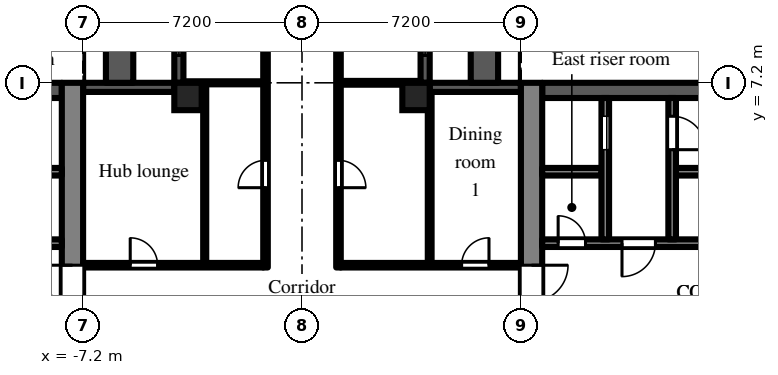
"""IFC4 building model, lengths in metres.
Left out: names, types, materials, properties, quantities, classifications, styles, units other than length and angle.
Written with IfcOpenShell. Run it as: python <this file> out.ifc"""

import sys

from ifc_helpers import new_model, si_unit, direction, frame, frame_2d, origin, origin_2d, place, context, subcontext, project, spatial, rectangle, extrude, element, fill, save


model = new_model("IFC4")
c1 = context("Model", 3, precision=1e-05, world=origin(), true_north=direction((0.0, 1.0)))
c2 = subcontext(c1, "Body", "Model", "MODEL_VIEW")
j1 = project(units=[si_unit("LENGTHUNIT", "METRE"), si_unit("PLANEANGLEUNIT", "RADIAN")], contexts=[c1])
p1 = place(None, origin())
s1 = spatial("IfcSite", under=j1, at=p1, CompositionType="ELEMENT")
p2 = place(p1, origin())
s2 = spatial("IfcBuilding", under=s1, at=p2, CompositionType="ELEMENT")
p3 = place(p2, frame((0.0, 0.0, 11.7)))
s3 = spatial("IfcBuildingStorey", under=s2, at=p3, CompositionType="ELEMENT", Elevation=11.7)
for number, where, z_axis, x_axis in (
    (1, (-3.75, 6.75, 0.0), (0.0, 0.0, 1.0), (1.0, 0.0, 0.0)),
    (2, (3.75, 6.75, 0.0), (0.0, 0.0, 1.0), (1.0, 0.0, 0.0)),
):
    element("IfcColumn", number, at=place(p3, frame(where, z_axis=z_axis, x_axis=x_axis)), inside=s3, PredefinedType="COLUMN", context=c2, shape_type="SweptSolid", body=[
        extrude(rectangle(XDim=0.9, YDim=0.9, at=origin_2d()), origin(), (0.0, 0.0, 1.0), 3.0),
    ])
p4 = place(p3, frame((7.2, 7.05, 0.0), z_axis=(0.0, 0.0, 1.0), x_axis=(-1.0, 0.0, 0.0)))
e3 = element("IfcWall", 3, at=p4, inside=s3, PredefinedType="SOLIDWALL", context=c2, shape_type="SweptSolid", body=[
    extrude(rectangle(XDim=3.0, YDim=0.3, at=frame_2d((1.5, 0.0))), origin(), (0.0, 0.0, 1.0), 2.1),
])
p5 = place(p3, frame((4.05, 7.2, 0.0), z_axis=(0.0, 0.0, 1.0), x_axis=(0.0, 1.0, 0.0)))
e4 = element("IfcWall", 4, at=p5, inside=s3, PredefinedType="SOLIDWALL", context=c2, shape_type="SweptSolid", body=[
    extrude(rectangle(XDim=7.2, YDim=0.3, at=frame_2d((3.6, 0.0))), origin(), (0.0, 0.0, 1.0), 2.1),
])
p6 = place(p5, frame((3.0, 0.0, 0.0)))
e5 = element("IfcOpeningElement", 5, at=p6, cuts=e4, PredefinedType="OPENING", context=c2, shape_type="SweptSolid", body=[
    extrude(rectangle(XDim=1.2, YDim=2.05, at=frame_2d((0.6, 1.025))), frame((0.0, 0.16, 0.0), z_axis=(0.0, -1.0, 0.0), x_axis=(1.0, 0.0, 0.0)), (0.0, 0.0, 1.0), 0.32),
])
p7 = place(p5, frame((0.9, 0.0, 0.2)))
e6 = element("IfcOpeningElement", 6, at=p7, cuts=e4, PredefinedType="OPENING", context=c2, shape_type="SweptSolid", body=[
    extrude(rectangle(XDim=1.8, YDim=1.85, at=frame_2d((0.9, 0.925))), frame((0.0, 0.16, 0.0), z_axis=(0.0, -1.0, 0.0), x_axis=(1.0, 0.0, 0.0)), (0.0, 0.0, 1.0), 0.32),
])
p8 = place(p5, frame((4.5, 0.0, 0.2)))
e7 = element("IfcOpeningElement", 7, at=p8, cuts=e4, PredefinedType="OPENING", context=c2, shape_type="SweptSolid", body=[
    extrude(rectangle(XDim=1.8, YDim=1.85, at=frame_2d((0.9, 0.925))), frame((0.0, 0.16, 0.0), z_axis=(0.0, -1.0, 0.0), x_axis=(1.0, 0.0, 0.0)), (0.0, 0.0, 1.0), 0.32),
])
p9 = place(p3, frame((-4.05, 14.4, 0.0), z_axis=(0.0, 0.0, 1.0), x_axis=(0.0, -1.0, 0.0)))
e8 = element("IfcWall", 8, at=p9, inside=s3, PredefinedType="SOLIDWALL", context=c2, shape_type="SweptSolid", body=[
    extrude(rectangle(XDim=7.2, YDim=0.3, at=frame_2d((3.6, 0.0))), origin(), (0.0, 0.0, 1.0), 2.1),
])
p10 = place(p9, frame((3.0, 0.0, 0.0)))
e9 = element("IfcOpeningElement", 9, at=p10, cuts=e8, PredefinedType="OPENING", context=c2, shape_type="SweptSolid", body=[
    extrude(rectangle(XDim=1.2, YDim=2.05, at=frame_2d((0.6, 1.025))), frame((0.0, 0.16, 0.0), z_axis=(0.0, -1.0, 0.0), x_axis=(1.0, 0.0, 0.0)), (0.0, 0.0, 1.0), 0.32),
])
p11 = place(p9, frame((0.9, 0.0, 0.2)))
e10 = element("IfcOpeningElement", 10, at=p11, cuts=e8, PredefinedType="OPENING", context=c2, shape_type="SweptSolid", body=[
    extrude(rectangle(XDim=1.8, YDim=1.85, at=frame_2d((0.9, 0.925))), frame((0.0, 0.16, 0.0), z_axis=(0.0, -1.0, 0.0), x_axis=(1.0, 0.0, 0.0)), (0.0, 0.0, 1.0), 0.32),
])
p12 = place(p9, frame((4.5, 0.0, 0.2)))
e11 = element("IfcOpeningElement", 11, at=p12, cuts=e8, PredefinedType="OPENING", context=c2, shape_type="SweptSolid", body=[
    extrude(rectangle(XDim=1.8, YDim=1.85, at=frame_2d((0.9, 0.925))), frame((0.0, 0.16, 0.0), z_axis=(0.0, -1.0, 0.0), x_axis=(1.0, 0.0, 0.0)), (0.0, 0.0, 1.0), 0.32),
])
p13 = place(p3, frame((-4.2, 7.05, 0.0), z_axis=(0.0, 0.0, 1.0), x_axis=(-1.0, 0.0, 0.0)))
e12 = element("IfcWall", 12, at=p13, inside=s3, PredefinedType="SOLIDWALL", context=c2, shape_type="SweptSolid", body=[
    extrude(rectangle(XDim=3.0, YDim=0.3, at=frame_2d((1.5, 0.0))), origin(), (0.0, 0.0, 1.0), 2.1),
])
for number, where, z_axis, x_axis in (
    (13, (6.0, 7.2, 0.0), (0.0, 0.0, 1.0), (0.0, 1.0, 0.0)),
    (14, (-6.0, 7.2, 0.0), (0.0, 0.0, 1.0), (0.0, 1.0, 0.0)),
):
    element("IfcWall", number, at=place(p3, frame(where, z_axis=z_axis, x_axis=x_axis)), inside=s3, PredefinedType="PARAPET", context=c2, shape_type="SweptSolid", body=[
        extrude(rectangle(XDim=7.2, YDim=0.9, at=frame_2d((3.6, 0.0))), origin(), (0.0, 0.0, 1.0), 0.8),
    ])
p14 = place(p3, frame((7.55, -7.2, 0.0), z_axis=(0.0, 0.0, 1.0), x_axis=(0.0, 1.0, 0.0)))
e15 = element("IfcWall", 15, at=p14, inside=s3, PredefinedType="SHEAR", context=c2, shape_type="SweptSolid", body=[
    extrude(rectangle(XDim=14.4, YDim=0.7, at=frame_2d((7.2, 0.0))), origin(), (0.0, 0.0, 1.0), 2.575),
])
p15 = place(p14, frame((6.0, 0.0, 0.0)))
e16 = element("IfcOpeningElement", 16, at=p15, cuts=e15, PredefinedType="OPENING", context=c2, shape_type="SweptSolid", body=[
    extrude(rectangle(XDim=2.4, YDim=2.2, at=frame_2d((1.2, 1.1))), frame((0.0, 0.36, 0.0), z_axis=(0.0, -1.0, 0.0), x_axis=(1.0, 0.0, 0.0)), (0.0, 0.0, 1.0), 0.72),
])
p16 = place(p3, frame((7.9, 6.95, 0.0), z_axis=(0.0, 0.0, 1.0), x_axis=(1.0, 0.0, 0.0)))
e17 = element("IfcWall", 17, at=p16, inside=s3, PredefinedType="SHEAR", context=c2, shape_type="SweptSolid", body=[
    extrude(rectangle(XDim=12.95, YDim=0.5, at=frame_2d((6.475, 0.0))), origin(), (0.0, 0.0, 1.0), 2.575),
])
p17 = place(p3, frame((7.9, 1.925, 0.0), z_axis=(0.0, 0.0, 1.0), x_axis=(1.0, 0.0, 0.0)))
e18 = element("IfcWall", 18, at=p17, inside=s3, PredefinedType="SHEAR", context=c2, shape_type="SweptSolid", body=[
    extrude(rectangle(XDim=12.95, YDim=0.25, at=frame_2d((6.475, 0.0))), origin(), (0.0, 0.0, 1.0), 2.575),
])
p18 = place(p17, frame((0.525, 0.0, 0.0)))
e19 = element("IfcOpeningElement", 19, at=p18, cuts=e18, PredefinedType="OPENING", context=c2, shape_type="SweptSolid", body=[
    extrude(rectangle(XDim=0.9, YDim=2.1, at=frame_2d((0.45, 1.05))), frame((0.0, 0.135, 0.0), z_axis=(0.0, -1.0, 0.0), x_axis=(1.0, 0.0, 0.0)), (0.0, 0.0, 1.0), 0.27),
])
p19 = place(p17, frame((2.625, 0.0, 0.0)))
e20 = element("IfcOpeningElement", 20, at=p19, cuts=e18, PredefinedType="OPENING", context=c2, shape_type="SweptSolid", body=[
    extrude(rectangle(XDim=1.1, YDim=2.1, at=frame_2d((0.55, 1.05))), frame((0.0, 0.135, 0.0), z_axis=(0.0, -1.0, 0.0), x_axis=(1.0, 0.0, 0.0)), (0.0, 0.0, 1.0), 0.27),
])
p20 = place(p17, frame((7.125, 0.0, 0.0)))
e21 = element("IfcOpeningElement", 21, at=p20, cuts=e18, PredefinedType="OPENING", context=c2, shape_type="SweptSolid", body=[
    extrude(rectangle(XDim=0.9, YDim=2.1, at=frame_2d((0.45, 1.05))), frame((0.0, 0.135, 0.0), z_axis=(0.0, -1.0, 0.0), x_axis=(1.0, 0.0, 0.0)), (0.0, 0.0, 1.0), 0.27),
])
p21 = place(p3, frame((7.9, 4.275, 0.0), z_axis=(0.0, 0.0, 1.0), x_axis=(1.0, 0.0, 0.0)))
e22 = element("IfcWall", 22, at=p21, inside=s3, PredefinedType="SHEAR", context=c2, shape_type="SweptSolid", body=[
    extrude(rectangle(XDim=1.95, YDim=0.25, at=frame_2d((0.975, 0.0))), origin(), (0.0, 0.0, 1.0), 2.575),
])
p22 = place(p3, frame((12.3, 4.275, 0.0), z_axis=(0.0, 0.0, 1.0), x_axis=(1.0, 0.0, 0.0)))
e23 = element("IfcWall", 23, at=p22, inside=s3, PredefinedType="SHEAR", context=c2, shape_type="SweptSolid", body=[
    extrude(rectangle(XDim=8.55, YDim=0.25, at=frame_2d((4.275, 0.0))), origin(), (0.0, 0.0, 1.0), 2.575),
])
p23 = place(p3, frame((9.975, 2.05, 0.0), z_axis=(0.0, 0.0, 1.0), x_axis=(0.0, 1.0, 0.0)))
e24 = element("IfcWall", 24, at=p23, inside=s3, PredefinedType="SHEAR", context=c2, shape_type="SweptSolid", body=[
    extrude(rectangle(XDim=4.65, YDim=0.25, at=frame_2d((2.325, 0.0))), origin(), (0.0, 0.0, 1.0), 2.575),
])
p24 = place(p23, frame((2.95, 0.0, 0.0)))
e25 = element("IfcOpeningElement", 25, at=p24, cuts=e24, PredefinedType="OPENING", context=c2, shape_type="SweptSolid", body=[
    extrude(rectangle(XDim=1.1, YDim=2.1, at=frame_2d((0.55, 1.05))), frame((0.0, 0.135, 0.0), z_axis=(0.0, -1.0, 0.0), x_axis=(1.0, 0.0, 0.0)), (0.0, 0.0, 1.0), 0.27),
])
p25 = place(p3, frame((12.175, 2.05, 0.0), z_axis=(0.0, 0.0, 1.0), x_axis=(0.0, 1.0, 0.0)))
e26 = element("IfcWall", 26, at=p25, inside=s3, PredefinedType="SHEAR", context=c2, shape_type="SweptSolid", body=[
    extrude(rectangle(XDim=4.65, YDim=0.25, at=frame_2d((2.325, 0.0))), origin(), (0.0, 0.0, 1.0), 2.575),
])
p26 = place(p25, frame((2.95, 0.0, 0.0)))
e27 = element("IfcOpeningElement", 27, at=p26, cuts=e26, PredefinedType="OPENING", context=c2, shape_type="SweptSolid", body=[
    extrude(rectangle(XDim=1.1, YDim=2.1, at=frame_2d((0.55, 1.05))), frame((0.0, 0.135, 0.0), z_axis=(0.0, -1.0, 0.0), x_axis=(1.0, 0.0, 0.0)), (0.0, 0.0, 1.0), 0.27),
])
p27 = place(p3, frame((-7.55, -7.2, 0.0), z_axis=(0.0, 0.0, 1.0), x_axis=(0.0, 1.0, 0.0)))
e28 = element("IfcWall", 28, at=p27, inside=s3, PredefinedType="SHEAR", context=c2, shape_type="SweptSolid", body=[
    extrude(rectangle(XDim=14.4, YDim=0.7, at=frame_2d((7.2, 0.0))), origin(), (0.0, 0.0, 1.0), 2.575),
])
p28 = place(p27, frame((6.0, 0.0, 0.0)))
e29 = element("IfcOpeningElement", 29, at=p28, cuts=e28, PredefinedType="OPENING", context=c2, shape_type="SweptSolid", body=[
    extrude(rectangle(XDim=2.4, YDim=2.2, at=frame_2d((1.2, 1.1))), frame((0.0, 0.36, 0.0), z_axis=(0.0, -1.0, 0.0), x_axis=(1.0, 0.0, 0.0)), (0.0, 0.0, 1.0), 0.72),
])
p29 = place(p3, frame((-7.9, 6.95, 0.0), z_axis=(0.0, 0.0, 1.0), x_axis=(-1.0, 0.0, 0.0)))
e30 = element("IfcWall", 30, at=p29, inside=s3, PredefinedType="SHEAR", context=c2, shape_type="SweptSolid", body=[
    extrude(rectangle(XDim=12.95, YDim=0.5, at=frame_2d((6.475, 0.0))), origin(), (0.0, 0.0, 1.0), 2.575),
])
p30 = place(p3, frame((-7.9, 1.925, 0.0), z_axis=(0.0, 0.0, 1.0), x_axis=(-1.0, 0.0, 0.0)))
e31 = element("IfcWall", 31, at=p30, inside=s3, PredefinedType="SHEAR", context=c2, shape_type="SweptSolid", body=[
    extrude(rectangle(XDim=12.95, YDim=0.25, at=frame_2d((6.475, 0.0))), origin(), (0.0, 0.0, 1.0), 2.575),
])
p31 = place(p30, frame((0.525, 0.0, 0.0)))
e32 = element("IfcOpeningElement", 32, at=p31, cuts=e31, PredefinedType="OPENING", context=c2, shape_type="SweptSolid", body=[
    extrude(rectangle(XDim=0.9, YDim=2.1, at=frame_2d((0.45, 1.05))), frame((0.0, 0.135, 0.0), z_axis=(0.0, -1.0, 0.0), x_axis=(1.0, 0.0, 0.0)), (0.0, 0.0, 1.0), 0.27),
])
p32 = place(p30, frame((2.625, 0.0, 0.0)))
e33 = element("IfcOpeningElement", 33, at=p32, cuts=e31, PredefinedType="OPENING", context=c2, shape_type="SweptSolid", body=[
    extrude(rectangle(XDim=1.1, YDim=2.1, at=frame_2d((0.55, 1.05))), frame((0.0, 0.135, 0.0), z_axis=(0.0, -1.0, 0.0), x_axis=(1.0, 0.0, 0.0)), (0.0, 0.0, 1.0), 0.27),
])
p33 = place(p30, frame((7.125, 0.0, 0.0)))
e34 = element("IfcOpeningElement", 34, at=p33, cuts=e31, PredefinedType="OPENING", context=c2, shape_type="SweptSolid", body=[
    extrude(rectangle(XDim=0.9, YDim=2.1, at=frame_2d((0.45, 1.05))), frame((0.0, 0.135, 0.0), z_axis=(0.0, -1.0, 0.0), x_axis=(1.0, 0.0, 0.0)), (0.0, 0.0, 1.0), 0.27),
])
p34 = place(p3, frame((-7.9, 4.275, 0.0), z_axis=(0.0, 0.0, 1.0), x_axis=(-1.0, 0.0, 0.0)))
e35 = element("IfcWall", 35, at=p34, inside=s3, PredefinedType="SHEAR", context=c2, shape_type="SweptSolid", body=[
    extrude(rectangle(XDim=1.95, YDim=0.25, at=frame_2d((0.975, 0.0))), origin(), (0.0, 0.0, 1.0), 2.575),
])
p35 = place(p3, frame((-7.2, 1.2, 0.0), z_axis=(0.0, 0.0, 1.0), x_axis=(1.0, 0.0, 0.0)))
e36 = element("IfcWall", 36, at=p35, inside=s3, PredefinedType="PARTITIONING", context=c2, shape_type="SweptSolid", body=[
    extrude(rectangle(XDim=5.925, YDim=0.15, at=frame_2d((2.962, 0.0))), origin(), (0.0, 0.0, 1.0), 2.575),
])
p36 = place(p35, frame((1.55, 0.0, 0.0)))
e37 = element("IfcOpeningElement", 37, at=p36, cuts=e36, PredefinedType="OPENING", context=c2, shape_type="SweptSolid", body=[
    extrude(rectangle(XDim=0.9, YDim=2.1, at=frame_2d((0.45, 1.05))), frame((0.0, 0.085, 0.0), z_axis=(0.0, -1.0, 0.0), x_axis=(1.0, 0.0, 0.0)), (0.0, 0.0, 1.0), 0.17),
])
p37 = place(p3, frame((-3.9, 7.2, 0.0), z_axis=(0.0, 0.0, 1.0), x_axis=(1.0, 0.0, 0.0)))
e38 = element("IfcWall", 38, at=p37, inside=s3, PredefinedType="PARTITIONING", context=c2, shape_type="SweptSolid", body=[
    extrude(rectangle(XDim=2.625, YDim=0.1, at=frame_2d((1.312, 0.0))), origin(), (0.0, 0.0, 1.0), 2.575),
])
p38 = place(p3, frame((-3.2, 1.275, 0.0), z_axis=(0.0, 0.0, 1.0), x_axis=(0.0, 1.0, 0.0)))
e39 = element("IfcWall", 39, at=p38, inside=s3, PredefinedType="PARTITIONING", context=c2, shape_type="SweptSolid", body=[
    extrude(rectangle(XDim=5.875, YDim=0.1, at=frame_2d((2.938, 0.0))), origin(), (0.0, 0.0, 1.0), 2.575),
])
p39 = place(p3, frame((-1.2, 1.125, 0.0), z_axis=(0.0, 0.0, 1.0), x_axis=(0.0, 1.0, 0.0)))
e40 = element("IfcWall", 40, at=p39, inside=s3, PredefinedType="PARTITIONING", context=c2, shape_type="SweptSolid", body=[
    extrude(rectangle(XDim=35.375, YDim=0.15, at=frame_2d((17.688, 0.0))), origin(), (0.0, 0.0, 1.0), 2.575),
])
p40 = place(p39, frame((2.625, 0.0, 0.0)))
e41 = element("IfcOpeningElement", 41, at=p40, cuts=e40, PredefinedType="OPENING", context=c2, shape_type="SweptSolid", body=[
    extrude(rectangle(XDim=0.9, YDim=2.1, at=frame_2d((0.45, 1.05))), frame((0.0, 0.085, 0.0), z_axis=(0.0, -1.0, 0.0), x_axis=(1.0, 0.0, 0.0)), (0.0, 0.0, 1.0), 0.17),
])
p41 = place(p39, frame((11.025, 0.0, 0.0)))
e42 = element("IfcOpeningElement", 42, at=p41, cuts=e40, PredefinedType="OPENING", context=c2, shape_type="SweptSolid", body=[
    extrude(rectangle(XDim=0.9, YDim=2.1, at=frame_2d((0.45, 1.05))), frame((0.0, 0.085, 0.0), z_axis=(0.0, -1.0, 0.0), x_axis=(1.0, 0.0, 0.0)), (0.0, 0.0, 1.0), 0.17),
])
p42 = place(p39, frame((32.825, 0.0, 0.0)))
e43 = element("IfcOpeningElement", 43, at=p42, cuts=e40, PredefinedType="OPENING", context=c2, shape_type="SweptSolid", body=[
    extrude(rectangle(XDim=1.0, YDim=2.1, at=frame_2d((0.5, 1.05))), frame((0.0, 0.085, 0.0), z_axis=(0.0, -1.0, 0.0), x_axis=(1.0, 0.0, 0.0)), (0.0, 0.0, 1.0), 0.17),
])
p43 = place(p3, frame((1.2, 1.125, 0.0), z_axis=(0.0, 0.0, 1.0), x_axis=(0.0, 1.0, 0.0)))
e44 = element("IfcWall", 44, at=p43, inside=s3, PredefinedType="PARTITIONING", context=c2, shape_type="SweptSolid", body=[
    extrude(rectangle(XDim=35.375, YDim=0.15, at=frame_2d((17.688, 0.0))), origin(), (0.0, 0.0, 1.0), 2.575),
])
p44 = place(p43, frame((2.625, 0.0, 0.0)))
e45 = element("IfcOpeningElement", 45, at=p44, cuts=e44, PredefinedType="OPENING", context=c2, shape_type="SweptSolid", body=[
    extrude(rectangle(XDim=0.9, YDim=2.1, at=frame_2d((0.45, 1.05))), frame((0.0, 0.085, 0.0), z_axis=(0.0, -1.0, 0.0), x_axis=(1.0, 0.0, 0.0)), (0.0, 0.0, 1.0), 0.17),
])
p45 = place(p43, frame((11.425, 0.0, 0.0)))
e46 = element("IfcOpeningElement", 46, at=p45, cuts=e44, PredefinedType="OPENING", context=c2, shape_type="SweptSolid", body=[
    extrude(rectangle(XDim=0.9, YDim=2.1, at=frame_2d((0.45, 1.05))), frame((0.0, 0.085, 0.0), z_axis=(0.0, -1.0, 0.0), x_axis=(1.0, 0.0, 0.0)), (0.0, 0.0, 1.0), 0.17),
])
p46 = place(p43, frame((7.825, 0.0, 0.0)))
e47 = element("IfcOpeningElement", 47, at=p46, cuts=e44, PredefinedType="OPENING", context=c2, shape_type="SweptSolid", body=[
    extrude(rectangle(XDim=0.9, YDim=2.1, at=frame_2d((0.45, 1.05))), frame((0.0, 0.085, 0.0), z_axis=(0.0, -1.0, 0.0), x_axis=(1.0, 0.0, 0.0)), (0.0, 0.0, 1.0), 0.17),
])
p47 = place(p43, frame((32.825, 0.0, 0.0)))
e48 = element("IfcOpeningElement", 48, at=p47, cuts=e44, PredefinedType="OPENING", context=c2, shape_type="SweptSolid", body=[
    extrude(rectangle(XDim=1.0, YDim=2.1, at=frame_2d((0.5, 1.05))), frame((0.0, 0.085, 0.0), z_axis=(0.0, -1.0, 0.0), x_axis=(1.0, 0.0, 0.0)), (0.0, 0.0, 1.0), 0.17),
])
p48 = place(p3, frame((1.275, 1.2, 0.0), z_axis=(0.0, 0.0, 1.0), x_axis=(1.0, 0.0, 0.0)))
e49 = element("IfcWall", 49, at=p48, inside=s3, PredefinedType="PARTITIONING", context=c2, shape_type="SweptSolid", body=[
    extrude(rectangle(XDim=5.925, YDim=0.15, at=frame_2d((2.962, 0.0))), origin(), (0.0, 0.0, 1.0), 2.575),
])
p49 = place(p48, frame((3.975, 0.0, 0.0)))
e50 = element("IfcOpeningElement", 50, at=p49, cuts=e49, PredefinedType="OPENING", context=c2, shape_type="SweptSolid", body=[
    extrude(rectangle(XDim=0.9, YDim=2.1, at=frame_2d((0.45, 1.05))), frame((0.0, 0.085, 0.0), z_axis=(0.0, -1.0, 0.0), x_axis=(1.0, 0.0, 0.0)), (0.0, 0.0, 1.0), 0.17),
])
p50 = place(p3, frame((1.275, 7.2, 0.0), z_axis=(0.0, 0.0, 1.0), x_axis=(1.0, 0.0, 0.0)))
e51 = element("IfcWall", 51, at=p50, inside=s3, PredefinedType="PARTITIONING", context=c2, shape_type="SweptSolid", body=[
    extrude(rectangle(XDim=2.625, YDim=0.125, at=frame_2d((1.312, 0.0))), origin(), (0.0, 0.0, 1.0), 2.575),
])
p51 = place(p3, frame((4.2, 1.275, 0.0), z_axis=(0.0, 0.0, 1.0), x_axis=(0.0, 1.0, 0.0)))
e52 = element("IfcWall", 52, at=p51, inside=s3, PredefinedType="PARTITIONING", context=c2, shape_type="SweptSolid", body=[
    extrude(rectangle(XDim=5.625, YDim=0.125, at=frame_2d((2.812, 0.0))), origin(), (0.0, 0.0, 1.0), 2.575),
])
p52 = place(p7, origin())
e53 = element("IfcWindow", 53, at=p52, inside=s3, PartitioningType="SINGLE_PANEL", PredefinedType="WINDOW", context=c2, shape_type="SweptSolid", body=[
    extrude(rectangle(XDim=1.8, YDim=1.85, at=frame_2d((0.9, 0.925))), frame((0.0, 0.03, 0.0), z_axis=(0.0, -1.0, 0.0), x_axis=(1.0, 0.0, 0.0)), (0.0, 0.0, 1.0), 0.06),
])
fill(e6, e53)
p53 = place(p12, origin())
e54 = element("IfcWindow", 54, at=p53, inside=s3, PartitioningType="SINGLE_PANEL", PredefinedType="WINDOW", context=c2, shape_type="SweptSolid", body=[
    extrude(rectangle(XDim=1.8, YDim=1.85, at=frame_2d((0.9, 0.925))), frame((0.0, 0.03, 0.0), z_axis=(0.0, -1.0, 0.0), x_axis=(1.0, 0.0, 0.0)), (0.0, 0.0, 1.0), 0.06),
])
fill(e11, e54)
p54 = place(p24, origin())
e55 = element("IfcDoor", 55, at=p54, inside=s3, OperationType="SLIDING_TO_LEFT", PredefinedType="DOOR", context=c2, shape_type="SweptSolid", body=[
    extrude(rectangle(XDim=1.1, YDim=2.1, at=frame_2d((0.55, 1.05))), frame((0.0, 0.025, 0.0), z_axis=(0.0, -1.0, 0.0), x_axis=(1.0, 0.0, 0.0)), (0.0, 0.0, 1.0), 0.05),
])
fill(e25, e55)
p55 = place(p26, frame((1.1, 0.0, 0.0), z_axis=(0.0, 0.0, 1.0), x_axis=(-1.0, 0.0, 0.0)))
e56 = element("IfcDoor", 56, at=p55, inside=s3, OperationType="SINGLE_SWING_RIGHT", PredefinedType="DOOR", context=c2, shape_type="SweptSolid", body=[
    extrude(rectangle(XDim=1.1, YDim=2.1, at=frame_2d((0.55, 1.05))), frame((0.0, 0.025, 0.0), z_axis=(0.0, -1.0, 0.0), x_axis=(1.0, 0.0, 0.0)), (0.0, 0.0, 1.0), 0.05),
])
fill(e27, e56)
p56 = place(p18, origin())
e57 = element("IfcDoor", 57, at=p56, inside=s3, OperationType="SINGLE_SWING_LEFT", PredefinedType="DOOR", context=c2, shape_type="SweptSolid", body=[
    extrude(rectangle(XDim=0.9, YDim=2.1, at=frame_2d((0.45, 1.05))), frame((0.0, 0.025, 0.0), z_axis=(0.0, -1.0, 0.0), x_axis=(1.0, 0.0, 0.0)), (0.0, 0.0, 1.0), 0.05),
])
fill(e19, e57)
p57 = place(p19, frame((1.1, 0.0, 0.0), z_axis=(0.0, 0.0, 1.0), x_axis=(-1.0, 0.0, 0.0)))
e58 = element("IfcDoor", 58, at=p57, inside=s3, OperationType="SINGLE_SWING_RIGHT", PredefinedType="DOOR", context=c2, shape_type="SweptSolid", body=[
    extrude(rectangle(XDim=1.1, YDim=2.1, at=frame_2d((0.55, 1.05))), frame((0.0, 0.025, 0.0), z_axis=(0.0, -1.0, 0.0), x_axis=(1.0, 0.0, 0.0)), (0.0, 0.0, 1.0), 0.05),
])
fill(e20, e58)
p58 = place(p15, frame((2.4, 0.0, 0.0), z_axis=(0.0, 0.0, 1.0), x_axis=(-1.0, 0.0, 0.0)))
e59 = element("IfcDoor", 59, at=p58, inside=s3, OperationType="DOUBLE_DOOR_DOUBLE_SWING", PredefinedType="DOOR", context=c2, shape_type="SweptSolid", body=[
    extrude(rectangle(XDim=2.4, YDim=2.2, at=frame_2d((1.2, 1.1))), frame((0.0, 0.025, 0.0), z_axis=(0.0, -1.0, 0.0), x_axis=(1.0, 0.0, 0.0)), (0.0, 0.0, 1.0), 0.05),
])
fill(e16, e59)
p59 = place(p28, origin())
e60 = element("IfcDoor", 60, at=p59, inside=s3, OperationType="DOUBLE_DOOR_DOUBLE_SWING", PredefinedType="DOOR", context=c2, shape_type="SweptSolid", body=[
    extrude(rectangle(XDim=2.4, YDim=2.2, at=frame_2d((1.2, 1.1))), frame((0.0, 0.025, 0.0), z_axis=(0.0, -1.0, 0.0), x_axis=(1.0, 0.0, 0.0)), (0.0, 0.0, 1.0), 0.05),
])
fill(e29, e60)
p60 = place(p44, frame((0.9, 0.0, 0.0), z_axis=(0.0, 0.0, 1.0), x_axis=(-1.0, 0.0, 0.0)))
e61 = element("IfcDoor", 61, at=p60, inside=s3, OperationType="SINGLE_SWING_RIGHT", PredefinedType="DOOR", context=c2, shape_type="SweptSolid", body=[
    extrude(rectangle(XDim=0.9, YDim=2.1, at=frame_2d((0.45, 1.05))), frame((0.0, 0.025, 0.0), z_axis=(0.0, -1.0, 0.0), x_axis=(1.0, 0.0, 0.0)), (0.0, 0.0, 1.0), 0.05),
])
fill(e45, e61)
p61 = place(p49, origin())
e62 = element("IfcDoor", 62, at=p61, inside=s3, OperationType="SINGLE_SWING_RIGHT", PredefinedType="DOOR", context=c2, shape_type="SweptSolid", body=[
    extrude(rectangle(XDim=0.9, YDim=2.1, at=frame_2d((0.45, 1.05))), frame((0.0, 0.025, 0.0), z_axis=(0.0, -1.0, 0.0), x_axis=(1.0, 0.0, 0.0)), (0.0, 0.0, 1.0), 0.05),
])
fill(e50, e62)
p62 = place(p40, origin())
e63 = element("IfcDoor", 63, at=p62, inside=s3, OperationType="SINGLE_SWING_LEFT", PredefinedType="DOOR", context=c2, shape_type="SweptSolid", body=[
    extrude(rectangle(XDim=0.9, YDim=2.1, at=frame_2d((0.45, 1.05))), frame((0.0, 0.025, 0.0), z_axis=(0.0, -1.0, 0.0), x_axis=(1.0, 0.0, 0.0)), (0.0, 0.0, 1.0), 0.05),
])
fill(e41, e63)
p63 = place(p36, origin())
e64 = element("IfcDoor", 64, at=p63, inside=s3, OperationType="SINGLE_SWING_LEFT", PredefinedType="DOOR", context=c2, shape_type="SweptSolid", body=[
    extrude(rectangle(XDim=0.9, YDim=2.1, at=frame_2d((0.45, 1.05))), frame((0.0, 0.025, 0.0), z_axis=(0.0, -1.0, 0.0), x_axis=(1.0, 0.0, 0.0)), (0.0, 0.0, 1.0), 0.05),
])
fill(e37, e64)
save(model, sys.argv[1])
